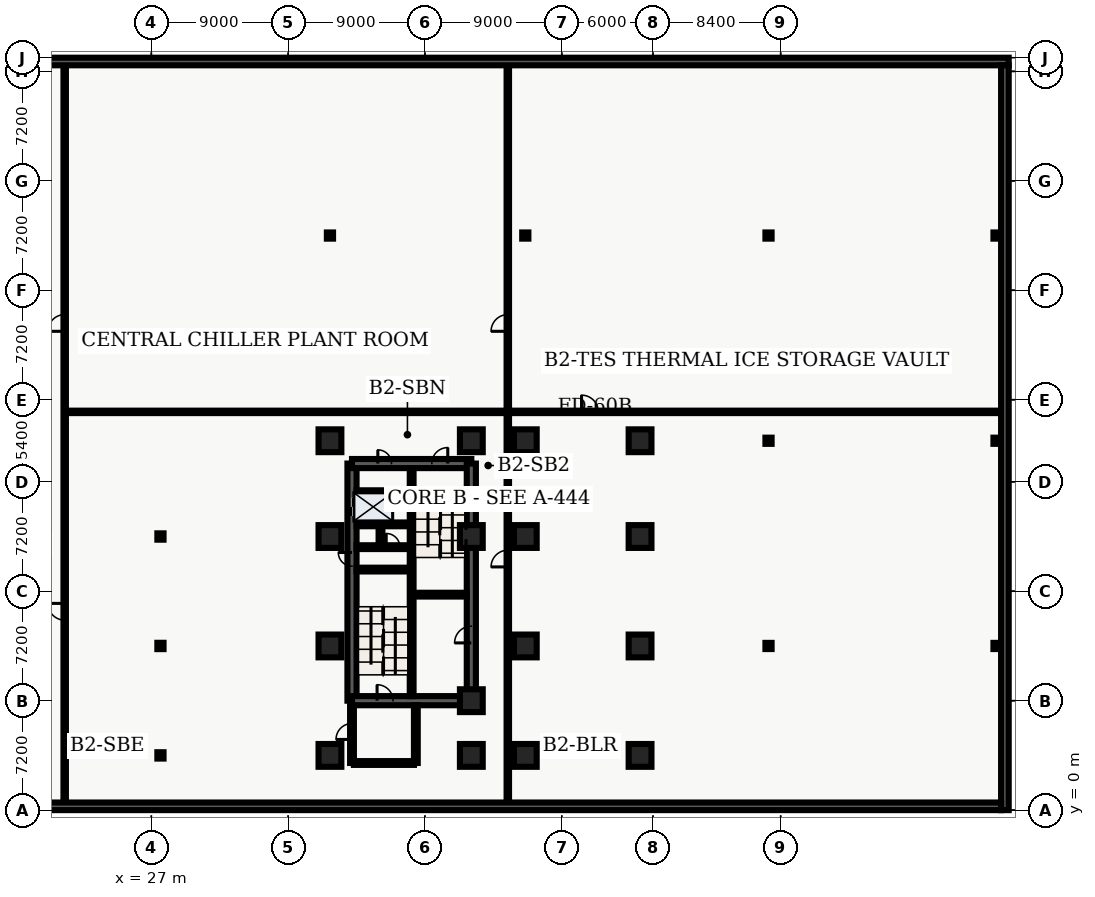
"""IFC4 building model, lengths in metres.
Left out: names, types, materials, properties, quantities, classifications, styles, units other than length and angle.
Written with IfcOpenShell. Run it as: python <this file> out.ifc"""

import sys

from ifc_helpers import new_model, entity, si_unit, converted_unit, direction, frame, origin_with_axes, origin_2d_with_axis, place, context, subcontext, project, spatial, polyline, rectangle, hollow_rectangle, i_section, outline, extrude, element, fill, save


model = new_model("IFC4")
c1 = context("Model", 3, precision=1e-05, world=origin_with_axes(), true_north=direction((0.0, 1.0)))
c2 = subcontext(c1, "Body", "Model", "MODEL_VIEW")
j1 = project(units=[si_unit("LENGTHUNIT", "METRE"), converted_unit("PLANEANGLEUNIT", "DEGREE", entity("IfcPlaneAngleMeasure", 0.017), si_unit("PLANEANGLEUNIT", "RADIAN"), dimensions=[0, 0, 0, 0, 0, 0, 0])], contexts=[c1])
p1 = place(None, origin_with_axes())
s1 = spatial("IfcSite", under=j1, at=p1, CompositionType="ELEMENT")
p2 = place(p1, origin_with_axes())
s2 = spatial("IfcBuilding", under=s1, at=p2, CompositionType="ELEMENT")
p3 = place(p2, frame((0.0, 0.0, -10.2), z_axis=(0.0, 0.0, 1.0), x_axis=(1.0, 0.0, 0.0)))
s3 = spatial("IfcBuildingStorey", under=s2, at=p3, CompositionType="ELEMENT", Elevation=-10.2)
p4 = place(p3, frame((40.2, 7.2, 0.0), z_axis=(0.0, 0.0, 1.0), x_axis=(0.0, 1.0, 0.0)))
e1 = element("IfcWall", 1, at=p4, inside=s3, PredefinedType="SHEAR", context=c2, shape_type="SweptSolid", body=[
    extrude(outline(polyline([(0.0, -0.3), (15.6, -0.3), (15.6, 0.3), (0.0, 0.3), (0.0, -0.3)])), origin_with_axes(), (0.0, 0.0, 1.0), 5.08),
])
p5 = place(p4, frame((12.75, 0.0, 0.0), z_axis=(0.0, 0.0, 1.0), x_axis=(1.0, 0.0, 0.0)))
e2 = element("IfcOpeningElement", 2, at=p5, cuts=e1, PredefinedType="OPENING", context=c2, shape_type="SweptSolid", body=[
    extrude(rectangle(XDim=1.2, YDim=0.62, at=origin_2d_with_axis()), origin_with_axes(), (0.0, 0.0, 1.0), 2.15),
])
p6 = place(p4, frame((9.3, 0.0, 0.0), z_axis=(0.0, 0.0, 1.0), x_axis=(1.0, 0.0, 0.0)))
e3 = element("IfcOpeningElement", 3, at=p6, cuts=e1, PredefinedType="OPENING", context=c2, shape_type="SweptSolid", body=[
    extrude(rectangle(XDim=0.9, YDim=0.62, at=origin_2d_with_axis()), origin_with_axes(), (0.0, 0.0, 1.0), 2.15),
])
p7 = place(p3, frame((40.2, 7.2, 0.0), z_axis=(0.0, 0.0, 1.0), x_axis=(1.0, 0.0, 0.0)))
e4 = element("IfcWall", 4, at=p7, inside=s3, PredefinedType="SHEAR", context=c2, shape_type="SweptSolid", body=[
    extrude(outline(polyline([(0.0, -0.3), (7.85, -0.3), (7.85, 0.3), (0.0, 0.3), (0.0, -0.3)])), origin_with_axes(), (0.0, 0.0, 1.0), 5.08),
])
p8 = place(p7, frame((2.175, 0.0, 0.0), z_axis=(0.0, 0.0, 1.0), x_axis=(1.0, 0.0, 0.0)))
e5 = element("IfcOpeningElement", 5, at=p8, cuts=e4, PredefinedType="OPENING", context=c2, shape_type="SweptSolid", body=[
    extrude(rectangle(XDim=1.05, YDim=0.62, at=origin_2d_with_axis()), origin_with_axes(), (0.0, 0.0, 1.0), 2.15),
])
p9 = place(p3, frame((40.2, 22.8, 0.0), z_axis=(0.0, 0.0, 1.0), x_axis=(1.0, 0.0, 0.0)))
e6 = element("IfcWall", 6, at=p9, inside=s3, PredefinedType="SHEAR", context=c2, shape_type="SweptSolid", body=[
    extrude(outline(polyline([(0.0, -0.3), (7.85, -0.3), (7.85, 0.3), (0.0, 0.3), (0.0, -0.3)])), origin_with_axes(), (0.0, 0.0, 1.0), 5.08),
])
p10 = place(p9, frame((5.775, 0.0, 0.0), z_axis=(0.0, 0.0, 1.0), x_axis=(1.0, 0.0, 0.0)))
e7 = element("IfcOpeningElement", 7, at=p10, cuts=e6, PredefinedType="OPENING", context=c2, shape_type="SweptSolid", body=[
    extrude(rectangle(XDim=1.05, YDim=0.62, at=origin_2d_with_axis()), origin_with_axes(), (0.0, 0.0, 1.0), 2.15),
])
p11 = place(p9, frame((2.15, 0.0, 0.0), z_axis=(0.0, 0.0, 1.0), x_axis=(1.0, 0.0, 0.0)))
e8 = element("IfcOpeningElement", 8, at=p11, cuts=e6, PredefinedType="OPENING", context=c2, shape_type="SweptSolid", body=[
    extrude(rectangle(XDim=0.9, YDim=0.62, at=origin_2d_with_axis()), origin_with_axes(), (0.0, 0.0, 1.0), 2.15),
])
p12 = place(p3, frame((48.05, 7.2, 0.0), z_axis=(0.0, 0.0, 1.0), x_axis=(0.0, 1.0, 0.0)))
e9 = element("IfcWall", 9, at=p12, inside=s3, PredefinedType="SHEAR", context=c2, shape_type="SweptSolid", body=[
    extrude(outline(polyline([(0.0, -0.3), (15.6, -0.3), (15.6, 0.3), (0.0, 0.3), (0.0, -0.3)])), origin_with_axes(), (0.0, 0.0, 1.0), 5.08),
])
p13 = place(p12, frame((4.35, 0.0, 0.0), z_axis=(0.0, 0.0, 1.0), x_axis=(1.0, 0.0, 0.0)))
e10 = element("IfcOpeningElement", 10, at=p13, cuts=e9, PredefinedType="OPENING", context=c2, shape_type="SweptSolid", body=[
    extrude(rectangle(XDim=1.1, YDim=0.62, at=origin_2d_with_axis()), origin_with_axes(), (0.0, 0.0, 1.0), 2.15),
])
p14 = place(p3, frame((44.125, 7.5, 0.0), z_axis=(0.0, 0.0, 1.0), x_axis=(0.0, 1.0, 0.0)))
e11 = element("IfcWall", 11, at=p14, inside=s3, PredefinedType="SHEAR", context=c2, shape_type="SweptSolid", body=[
    extrude(outline(polyline([(0.0, -0.125), (15.0, -0.125), (15.0, 0.125), (0.0, 0.125), (0.0, -0.125)])), origin_with_axes(), (0.0, 0.0, 1.0), 5.08),
])
for number, where, z_axis, x_axis in (
    (12, (40.5, 15.825, 0.0), (0.0, 0.0, 1.0), (1.0, 0.0, 0.0)),
    (13, (44.25, 14.175, 0.0), (0.0, 0.0, 1.0), (1.0, 0.0, 0.0)),
):
    element("IfcWall", number, at=place(p3, frame(where, z_axis=z_axis, x_axis=x_axis)), inside=s3, PredefinedType="SHEAR", context=c2, shape_type="SweptSolid", body=[
        extrude(outline(polyline([(0.0, -0.125), (3.5, -0.125), (3.5, 0.125), (0.0, 0.125), (0.0, -0.125)])), origin_with_axes(), (0.0, 0.0, 1.0), 5.08),
    ])
p15 = place(p3, frame((40.5, 17.3, 0.0), z_axis=(0.0, 0.0, 1.0), x_axis=(1.0, 0.0, 0.0)))
e14 = element("IfcWall", 14, at=p15, inside=s3, PredefinedType="SOLIDWALL", context=c2, shape_type="SweptSolid", body=[
    extrude(outline(polyline([(0.0, -0.125), (3.5, -0.125), (3.5, 0.125), (0.0, 0.125), (0.0, -0.125)])), origin_with_axes(), (0.0, 0.0, 1.0), 3.6),
])
p16 = place(p15, frame((2.4, 0.0, 0.0), z_axis=(0.0, 0.0, 1.0), x_axis=(1.0, 0.0, 0.0)))
e15 = element("IfcOpeningElement", 15, at=p16, cuts=e14, PredefinedType="OPENING", context=c2, shape_type="SweptSolid", body=[
    extrude(rectangle(XDim=0.9, YDim=0.27, at=origin_2d_with_axis()), origin_with_axes(), (0.0, 0.0, 1.0), 2.15),
])
p17 = place(p3, frame((40.5, 18.8, 0.0), z_axis=(0.0, 0.0, 1.0), x_axis=(1.0, 0.0, 0.0)))
e16 = element("IfcWall", 16, at=p17, inside=s3, PredefinedType="SOLIDWALL", context=c2, shape_type="SweptSolid", body=[
    extrude(outline(polyline([(0.0, -0.125), (3.5, -0.125), (3.5, 0.125), (0.0, 0.125), (0.0, -0.125)])), origin_with_axes(), (0.0, 0.0, 1.0), 3.6),
])
p18 = place(p3, frame((42.075, 17.43, 0.0), z_axis=(0.0, 0.0, 1.0), x_axis=(0.0, 1.0, 0.0)))
e17 = element("IfcWall", 17, at=p18, inside=s3, PredefinedType="SOLIDWALL", context=c2, shape_type="SweptSolid", body=[
    extrude(outline(polyline([(0.0, -0.125), (1.24, -0.125), (1.24, 0.125), (0.0, 0.125), (0.0, -0.125)])), origin_with_axes(), (0.0, 0.0, 1.0), 3.6),
])
p19 = place(p3, frame((40.2, 3.1, 0.0), z_axis=(0.0, 0.0, 1.0), x_axis=(0.0, 1.0, 0.0)))
e18 = element("IfcWall", 18, at=p19, inside=s3, PredefinedType="SOLIDWALL", context=c2, shape_type="SweptSolid", body=[
    extrude(outline(polyline([(0.0, -0.125), (3.8, -0.125), (3.8, 0.125), (0.0, 0.125), (0.0, -0.125)])), origin_with_axes(), (0.0, 0.0, 1.0), 3.6),
])
p20 = place(p19, frame((2.075, 0.0, 0.0), z_axis=(0.0, 0.0, 1.0), x_axis=(1.0, 0.0, 0.0)))
e19 = element("IfcOpeningElement", 19, at=p20, cuts=e18, PredefinedType="OPENING", context=c2, shape_type="SweptSolid", body=[
    extrude(rectangle(XDim=1.05, YDim=0.27, at=origin_2d_with_axis()), origin_with_axes(), (0.0, 0.0, 1.0), 2.15),
])
p21 = place(p3, frame((40.325, 3.1, 0.0), z_axis=(0.0, 0.0, 1.0), x_axis=(1.0, 0.0, 0.0)))
e20 = element("IfcWall", 20, at=p21, inside=s3, PredefinedType="SOLIDWALL", context=c2, shape_type="SweptSolid", body=[
    extrude(outline(polyline([(0.0, -0.125), (3.95, -0.125), (3.95, 0.125), (0.0, 0.125), (0.0, -0.125)])), origin_with_axes(), (0.0, 0.0, 1.0), 3.6),
])
p22 = place(p3, frame((44.4, 3.1, 0.0), z_axis=(0.0, 0.0, 1.0), x_axis=(0.0, 1.0, 0.0)))
e21 = element("IfcWall", 21, at=p22, inside=s3, PredefinedType="SOLIDWALL", context=c2, shape_type="SweptSolid", body=[
    extrude(outline(polyline([(0.0, -0.125), (3.8, -0.125), (3.8, 0.125), (0.0, 0.125), (0.0, -0.125)])), origin_with_axes(), (0.0, 0.0, 1.0), 3.6),
])
for number, where, z_axis, x_axis in (
    (22, (27.6, 3.6, 0.0), (0.0, 0.0, 1.0), (1.0, 0.0, 0.0)),
    (23, (27.6, 10.8, 0.0), (0.0, 0.0, 1.0), (1.0, 0.0, 0.0)),
    (24, (27.6, 18.0, 0.0), (0.0, 0.0, 1.0), (1.0, 0.0, 0.0)),
):
    element("IfcColumn", number, at=place(p3, frame(where, z_axis=z_axis, x_axis=x_axis)), inside=s3, PredefinedType="COLUMN", context=c2, shape_type="SweptSolid", body=[
        extrude(i_section(OverallWidth=0.406, OverallDepth=0.416, WebThickness=0.03, FlangeThickness=0.048, FilletRadius=0.022, at=origin_2d_with_axis()), origin_with_axes(), (0.0, 0.0, 1.0), 5.4),
    ])
for number, where, z_axis, x_axis in (
    (25, (38.75, 3.6, 0.0), (0.0, 0.0, 1.0), (1.0, 0.0, 0.0)),
    (26, (38.75, 10.8, 0.0), (0.0, 0.0, 1.0), (1.0, 0.0, 0.0)),
    (27, (38.75, 18.0, 0.0), (0.0, 0.0, 1.0), (1.0, 0.0, 0.0)),
    (28, (38.75, 24.3, 0.0), (0.0, 0.0, 1.0), (1.0, 0.0, 0.0)),
    (29, (48.05, 3.6, 0.0), (0.0, 0.0, 1.0), (1.0, 0.0, 0.0)),
    (30, (48.05, 7.2, 0.0), (0.0, 0.0, 1.0), (1.0, 0.0, 0.0)),
    (31, (48.05, 18.0, 0.0), (0.0, 0.0, 1.0), (1.0, 0.0, 0.0)),
    (32, (48.05, 24.3, 0.0), (0.0, 0.0, 1.0), (1.0, 0.0, 0.0)),
    (33, (51.6, 3.6, 0.0), (0.0, 0.0, 1.0), (1.0, 0.0, 0.0)),
    (34, (51.6, 10.8, 0.0), (0.0, 0.0, 1.0), (1.0, 0.0, 0.0)),
    (35, (51.6, 18.0, 0.0), (0.0, 0.0, 1.0), (1.0, 0.0, 0.0)),
    (36, (51.6, 24.3, 0.0), (0.0, 0.0, 1.0), (1.0, 0.0, 0.0)),
    (37, (59.15, 3.6, 0.0), (0.0, 0.0, 1.0), (1.0, 0.0, 0.0)),
    (38, (59.15, 10.8, 0.0), (0.0, 0.0, 1.0), (1.0, 0.0, 0.0)),
    (39, (59.15, 18.0, 0.0), (0.0, 0.0, 1.0), (1.0, 0.0, 0.0)),
    (40, (59.15, 24.3, 0.0), (0.0, 0.0, 1.0), (1.0, 0.0, 0.0)),
):
    element("IfcColumn", number, at=place(p3, frame(where, z_axis=z_axis, x_axis=x_axis)), inside=s3, PredefinedType="COLUMN", context=c2, shape_type="SweptSolid", body=[
        extrude(rectangle(XDim=1.5, YDim=1.5, at=origin_2d_with_axis()), origin_with_axes(), (0.0, 0.0, 1.0), 5.4),
    ])
for number, where, z_axis, x_axis in (
    (41, (67.6, 10.8, 0.0), (0.0, 0.0, 1.0), (1.0, 0.0, 0.0)),
    (42, (67.6, 24.3, 0.0), (0.0, 0.0, 1.0), (1.0, 0.0, 0.0)),
    (43, (67.6, 37.8, 0.0), (0.0, 0.0, 1.0), (1.0, 0.0, 0.0)),
    (44, (38.75, 37.8, 0.0), (0.0, 0.0, 1.0), (1.0, 0.0, 0.0)),
    (45, (51.6, 37.8, 0.0), (0.0, 0.0, 1.0), (1.0, 0.0, 0.0)),
    (46, (82.6, 10.8, 0.0), (0.0, 0.0, 1.0), (1.0, 0.0, 0.0)),
    (47, (82.6, 24.3, 0.0), (0.0, 0.0, 1.0), (1.0, 0.0, 0.0)),
    (48, (82.6, 37.8, 0.0), (0.0, 0.0, 1.0), (1.0, 0.0, 0.0)),
):
    element("IfcColumn", number, at=place(p3, frame(where, z_axis=z_axis, x_axis=x_axis)), inside=s3, PredefinedType="COLUMN", context=c2, shape_type="SweptSolid", body=[
        extrude(hollow_rectangle(XDim=0.406, YDim=0.406, WallThickness=0.015, InnerFilletRadius=0.015, OuterFilletRadius=0.03, at=origin_2d_with_axis()), origin_with_axes(), (0.0, 0.0, 1.0), 5.4),
    ])
p23 = place(p3, frame((40.5, 20.96, 0.0), z_axis=(0.0, 0.0, 1.0), x_axis=(1.0, 0.0, 0.0)))
e49 = element("IfcWall", 49, at=p23, inside=s3, PredefinedType="PARTITIONING", context=c2, shape_type="SweptSolid", body=[
    extrude(outline(polyline([(0.0, -0.08), (3.5, -0.08), (3.5, 0.08), (0.0, 0.08), (0.0, -0.08)])), origin_with_axes(), (0.0, 0.0, 1.0), 3.2),
])
p24 = place(p3, frame((21.3, 0.5, 0.0), z_axis=(0.0, 0.0, 1.0), x_axis=(0.0, 1.0, 0.0)))
e50 = element("IfcWall", 50, at=p24, inside=s3, PredefinedType="PARTITIONING", context=c2, shape_type="SweptSolid", body=[
    extrude(outline(polyline([(0.0, -0.08), (48.5, -0.08), (48.5, 0.08), (0.0, 0.08), (0.0, -0.08)])), origin_with_axes(), (0.0, 0.0, 1.0), 3.2),
])
p25 = place(p24, frame((31.55, 0.0, 0.0), z_axis=(0.0, 0.0, 1.0), x_axis=(1.0, 0.0, 0.0)))
e51 = element("IfcOpeningElement", 51, at=p25, cuts=e50, PredefinedType="OPENING", context=c2, shape_type="SweptSolid", body=[
    extrude(rectangle(XDim=1.1, YDim=0.18, at=origin_2d_with_axis()), origin_with_axes(), (0.0, 0.0, 1.0), 2.15),
])
p26 = place(p24, frame((12.55, 0.0, 0.0), z_axis=(0.0, 0.0, 1.0), x_axis=(1.0, 0.0, 0.0)))
e52 = element("IfcOpeningElement", 52, at=p26, cuts=e50, PredefinedType="OPENING", context=c2, shape_type="SweptSolid", body=[
    extrude(rectangle(XDim=1.1, YDim=0.18, at=origin_2d_with_axis()), origin_with_axes(), (0.0, 0.0, 1.0), 2.15),
])
p27 = place(p3, frame((21.3, 26.2, 0.0), z_axis=(0.0, 0.0, 1.0), x_axis=(1.0, 0.0, 0.0)))
e53 = element("IfcWall", 53, at=p27, inside=s3, PredefinedType="PARTITIONING", context=c2, shape_type="SweptSolid", body=[
    extrude(outline(polyline([(0.0, -0.08), (61.6, -0.08), (61.6, 0.08), (0.0, 0.08), (0.0, -0.08)])), origin_with_axes(), (0.0, 0.0, 1.0), 3.2),
])
p28 = place(p27, frame((34.55, 0.0, 0.0), z_axis=(0.0, 0.0, 1.0), x_axis=(1.0, 0.0, 0.0)))
e54 = element("IfcOpeningElement", 54, at=p28, cuts=e53, PredefinedType="OPENING", context=c2, shape_type="SweptSolid", body=[
    extrude(rectangle(XDim=1.1, YDim=0.18, at=origin_2d_with_axis()), origin_with_axes(), (0.0, 0.0, 1.0), 2.15),
])
p29 = place(p3, frame((50.45, 0.5, 0.0), z_axis=(0.0, 0.0, 1.0), x_axis=(0.0, 1.0, 0.0)))
e55 = element("IfcWall", 55, at=p29, inside=s3, PredefinedType="PARTITIONING", context=c2, shape_type="SweptSolid", body=[
    extrude(outline(polyline([(0.0, -0.08), (48.5, -0.08), (48.5, 0.08), (0.0, 0.08), (0.0, -0.08)])), origin_with_axes(), (0.0, 0.0, 1.0), 3.2),
])
p30 = place(p29, frame((31.55, 0.0, 0.0), z_axis=(0.0, 0.0, 1.0), x_axis=(1.0, 0.0, 0.0)))
e56 = element("IfcOpeningElement", 56, at=p30, cuts=e55, PredefinedType="OPENING", context=c2, shape_type="SweptSolid", body=[
    extrude(rectangle(XDim=1.1, YDim=0.18, at=origin_2d_with_axis()), origin_with_axes(), (0.0, 0.0, 1.0), 2.15),
])
p31 = place(p29, frame((16.05, 0.0, 0.0), z_axis=(0.0, 0.0, 1.0), x_axis=(1.0, 0.0, 0.0)))
e57 = element("IfcOpeningElement", 57, at=p31, cuts=e55, PredefinedType="OPENING", context=c2, shape_type="SweptSolid", body=[
    extrude(rectangle(XDim=1.1, YDim=0.18, at=origin_2d_with_axis()), origin_with_axes(), (0.0, 0.0, 1.0), 2.15),
])
p32 = place(p3, frame((0.5, 49.25, 0.0), z_axis=(0.0, 0.0, 1.0), x_axis=(1.0, 0.0, 0.0)))
e58 = element("IfcWall", 58, at=p32, inside=s3, PredefinedType="USERDEFINED", context=c2, shape_type="SweptSolid", body=[
    extrude(outline(polyline([(0.0, -0.25), (82.9, -0.25), (82.9, 0.25), (0.0, 0.25), (0.0, -0.25)])), origin_with_axes(), (0.0, 0.0, 1.0), 5.08),
])
p33 = place(p3, frame((83.15, 49.0, 0.0), z_axis=(0.0, 0.0, 1.0), x_axis=(0.0, -1.0, 0.0)))
e59 = element("IfcWall", 59, at=p33, inside=s3, PredefinedType="USERDEFINED", context=c2, shape_type="SweptSolid", body=[
    extrude(outline(polyline([(0.0, -0.25), (49.0, -0.25), (49.0, 0.25), (0.0, 0.25), (0.0, -0.25)])), origin_with_axes(), (0.0, 0.0, 1.0), 5.08),
])
p34 = place(p3, frame((82.9, 0.25, 0.0), z_axis=(0.0, 0.0, 1.0), x_axis=(-1.0, 0.0, 0.0)))
e60 = element("IfcWall", 60, at=p34, inside=s3, PredefinedType="USERDEFINED", context=c2, shape_type="SweptSolid", body=[
    extrude(outline(polyline([(0.0, -0.25), (82.9, -0.25), (82.9, 0.25), (0.0, 0.25), (0.0, -0.25)])), origin_with_axes(), (0.0, 0.0, 1.0), 5.08),
])
p35 = place(p4, frame((12.75, 0.0, 0.0), z_axis=(0.0, 0.0, 1.0), x_axis=(1.0, 0.0, 0.0)))
e61 = element("IfcDoor", 61, at=p35, inside=s3, OperationType="DOUBLE_DOOR_SLIDING", PredefinedType="DOOR", context=c2, shape_type="SweptSolid", body=[
    extrude(rectangle(XDim=1.2, YDim=0.09, at=origin_2d_with_axis()), origin_with_axes(), (0.0, 0.0, 1.0), 2.15),
])
fill(e2, e61)
p36 = place(p4, frame((9.3, 0.0, 0.0), z_axis=(0.0, 0.0, 1.0), x_axis=(1.0, 0.0, 0.0)))
e62 = element("IfcDoor", 62, at=p36, inside=s3, OperationType="SINGLE_SWING_RIGHT", PredefinedType="DOOR", context=c2, shape_type="SweptSolid", body=[
    extrude(rectangle(XDim=0.9, YDim=0.09, at=origin_2d_with_axis()), origin_with_axes(), (0.0, 0.0, 1.0), 2.15),
])
fill(e3, e62)
p37 = place(p15, frame((2.4, 0.0, 0.0), z_axis=(0.0, 0.0, 1.0), x_axis=(1.0, 0.0, 0.0)))
e63 = element("IfcDoor", 63, at=p37, inside=s3, OperationType="SINGLE_SWING_LEFT", PredefinedType="DOOR", context=c2, shape_type="SweptSolid", body=[
    extrude(rectangle(XDim=0.9, YDim=0.09, at=origin_2d_with_axis()), origin_with_axes(), (0.0, 0.0, 1.0), 2.15),
])
fill(e15, e63)
p38 = place(p7, frame((2.175, 0.0, 0.0), z_axis=(0.0, 0.0, 1.0), x_axis=(1.0, 0.0, 0.0)))
e64 = element("IfcDoor", 64, at=p38, inside=s3, OperationType="SINGLE_SWING_LEFT", PredefinedType="DOOR", context=c2, shape_type="SweptSolid", body=[
    extrude(rectangle(XDim=1.05, YDim=0.09, at=origin_2d_with_axis()), origin_with_axes(), (0.0, 0.0, 1.0), 2.15),
])
fill(e5, e64)
p39 = place(p9, frame((5.775, 0.0, 0.0), z_axis=(0.0, 0.0, 1.0), x_axis=(1.0, 0.0, 0.0)))
e65 = element("IfcDoor", 65, at=p39, inside=s3, OperationType="SINGLE_SWING_RIGHT", PredefinedType="DOOR", context=c2, shape_type="SweptSolid", body=[
    extrude(rectangle(XDim=1.05, YDim=0.09, at=origin_2d_with_axis()), origin_with_axes(), (0.0, 0.0, 1.0), 2.15),
])
fill(e7, e65)
p40 = place(p19, frame((2.075, 0.0, 0.0), z_axis=(0.0, 0.0, 1.0), x_axis=(1.0, 0.0, 0.0)))
e66 = element("IfcDoor", 66, at=p40, inside=s3, OperationType="SINGLE_SWING_LEFT", PredefinedType="DOOR", context=c2, shape_type="SweptSolid", body=[
    extrude(rectangle(XDim=1.05, YDim=0.09, at=origin_2d_with_axis()), origin_with_axes(), (0.0, 0.0, 1.0), 2.15),
])
fill(e19, e66)
p41 = place(p9, frame((2.15, 0.0, 0.0), z_axis=(0.0, 0.0, 1.0), x_axis=(1.0, 0.0, 0.0)))
e67 = element("IfcDoor", 67, at=p41, inside=s3, OperationType="SINGLE_SWING_LEFT", PredefinedType="DOOR", context=c2, shape_type="SweptSolid", body=[
    extrude(rectangle(XDim=0.9, YDim=0.09, at=origin_2d_with_axis()), origin_with_axes(), (0.0, 0.0, 1.0), 2.15),
])
fill(e8, e67)
p42 = place(p12, frame((4.35, 0.0, 0.0), z_axis=(0.0, 0.0, 1.0), x_axis=(1.0, 0.0, 0.0)))
e68 = element("IfcDoor", 68, at=p42, inside=s3, OperationType="SINGLE_SWING_LEFT", PredefinedType="DOOR", context=c2, shape_type="SweptSolid", body=[
    extrude(rectangle(XDim=1.1, YDim=0.09, at=origin_2d_with_axis()), origin_with_axes(), (0.0, 0.0, 1.0), 2.15),
])
fill(e10, e68)
p43 = place(p27, frame((34.55, 0.0, 0.0), z_axis=(0.0, 0.0, 1.0), x_axis=(1.0, 0.0, 0.0)))
e69 = element("IfcDoor", 69, at=p43, inside=s3, OperationType="SINGLE_SWING_LEFT", PredefinedType="DOOR", context=c2, shape_type="SweptSolid", body=[
    extrude(rectangle(XDim=1.1, YDim=0.09, at=origin_2d_with_axis()), origin_with_axes(), (0.0, 0.0, 1.0), 2.15),
])
fill(e54, e69)
p44 = place(p24, frame((31.55, 0.0, 0.0), z_axis=(0.0, 0.0, 1.0), x_axis=(1.0, 0.0, 0.0)))
e70 = element("IfcDoor", 70, at=p44, inside=s3, OperationType="SINGLE_SWING_LEFT", PredefinedType="DOOR", context=c2, shape_type="SweptSolid", body=[
    extrude(rectangle(XDim=1.1, YDim=0.09, at=origin_2d_with_axis()), origin_with_axes(), (0.0, 0.0, 1.0), 2.15),
])
fill(e51, e70)
p45 = place(p29, frame((31.55, 0.0, 0.0), z_axis=(0.0, 0.0, 1.0), x_axis=(1.0, 0.0, 0.0)))
e71 = element("IfcDoor", 71, at=p45, inside=s3, OperationType="SINGLE_SWING_LEFT", PredefinedType="DOOR", context=c2, shape_type="SweptSolid", body=[
    extrude(rectangle(XDim=1.1, YDim=0.09, at=origin_2d_with_axis()), origin_with_axes(), (0.0, 0.0, 1.0), 2.15),
])
fill(e56, e71)
p46 = place(p29, frame((16.05, 0.0, 0.0), z_axis=(0.0, 0.0, 1.0), x_axis=(1.0, 0.0, 0.0)))
e72 = element("IfcDoor", 72, at=p46, inside=s3, OperationType="SINGLE_SWING_LEFT", PredefinedType="DOOR", context=c2, shape_type="SweptSolid", body=[
    extrude(rectangle(XDim=1.1, YDim=0.09, at=origin_2d_with_axis()), origin_with_axes(), (0.0, 0.0, 1.0), 2.15),
])
fill(e57, e72)
p47 = place(p24, frame((12.55, 0.0, 0.0), z_axis=(0.0, 0.0, 1.0), x_axis=(1.0, 0.0, 0.0)))
e73 = element("IfcDoor", 73, at=p47, inside=s3, OperationType="SINGLE_SWING_RIGHT", PredefinedType="DOOR", context=c2, shape_type="SweptSolid", body=[
    extrude(rectangle(XDim=1.1, YDim=0.09, at=origin_2d_with_axis()), origin_with_axes(), (0.0, 0.0, 1.0), 2.15),
])
fill(e52, e73)
save(model, sys.argv[1])
